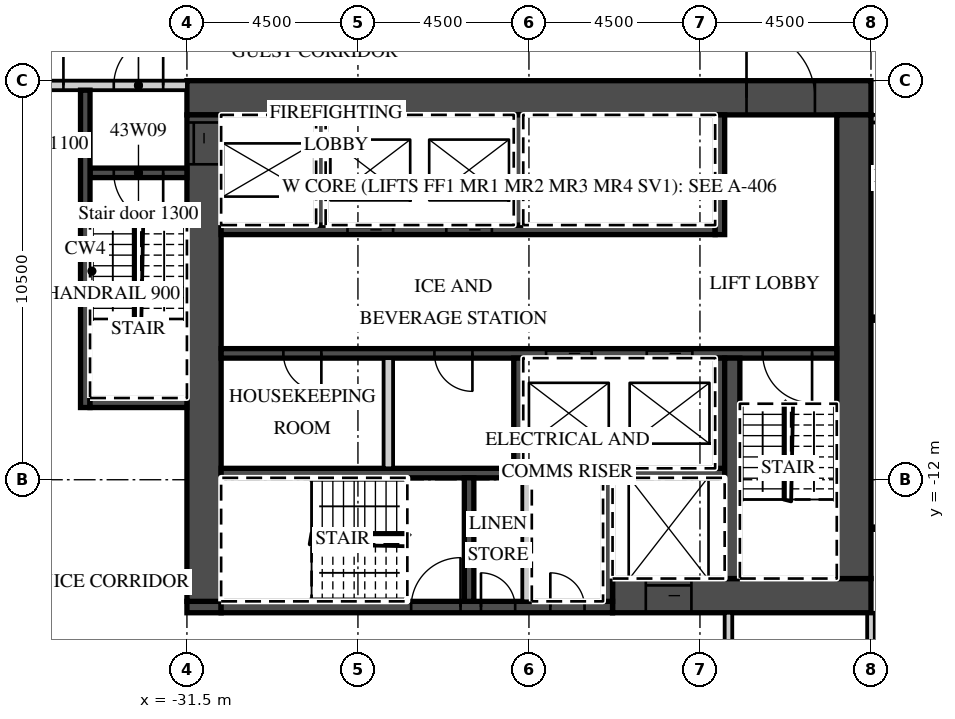
"""IFC4 building model, lengths in metres.
Left out: names, types, materials, properties, quantities, classifications, styles, units other than length and angle.
Written with IfcOpenShell. Run it as: python <this file> out.ifc"""

import sys

from ifc_helpers import new_model, si_unit, direction, frame, frame_2d, origin, place, context, subcontext, project, spatial, rectangle, extrude, element, fill, save


model = new_model("IFC4")
c1 = context("Model", 3, precision=1e-05, world=origin(), true_north=direction((0.0, 1.0)))
c2 = subcontext(c1, "Body", "Model", "MODEL_VIEW")
j1 = project(units=[si_unit("LENGTHUNIT", "METRE"), si_unit("PLANEANGLEUNIT", "RADIAN")], contexts=[c1])
p1 = place(None, origin())
s1 = spatial("IfcSite", under=j1, at=p1, CompositionType="ELEMENT")
p2 = place(p1, origin())
s2 = spatial("IfcBuilding", under=s1, at=p2, CompositionType="ELEMENT")
p3 = place(p2, frame((0.0, 0.0, 183.4)))
s3 = spatial("IfcBuildingStorey", under=s2, at=p3, CompositionType="ELEMENT", Elevation=183.4)
p4 = place(p3, frame((-13.5, -22.3, 0.0), z_axis=(0.0, 0.0, 1.0), x_axis=(0.0, 1.0, 0.0)))
e1 = element("IfcWall", 1, at=p4, inside=s3, PredefinedType="PARTITIONING", context=c2, shape_type="SweptSolid", body=[
    extrude(rectangle(XDim=6.8, YDim=0.2, at=frame_2d((3.4, 0.0))), origin(), (0.0, 0.0, 1.0), 3.02),
])
p5 = place(p3, frame((-13.5, -2.5, 0.0), z_axis=(0.0, 0.0, 1.0), x_axis=(1.0, 0.0, 0.0)))
e2 = element("IfcWall", 2, at=p5, inside=s3, PredefinedType="PARTITIONING", context=c2, shape_type="SweptSolid", body=[
    extrude(rectangle(XDim=27.0, YDim=0.2, at=frame_2d((13.5, 0.0))), origin(), (0.0, 0.0, 1.0), 3.02),
])
p6 = place(p5, frame((2.925, 0.0, 0.0)))
e3 = element("IfcOpeningElement", 3, at=p6, cuts=e2, PredefinedType="OPENING", context=c2, shape_type="SweptSolid", body=[
    extrude(rectangle(XDim=1.0, YDim=2.1, at=frame_2d((0.5, 1.05))), frame((0.0, 0.11, 0.0), z_axis=(0.0, -1.0, 0.0), x_axis=(1.0, 0.0, 0.0)), (0.0, 0.0, 1.0), 0.22),
])
p7 = place(p5, frame((7.45, 0.0, 0.0)))
e4 = element("IfcOpeningElement", 4, at=p7, cuts=e2, PredefinedType="OPENING", context=c2, shape_type="SweptSolid", body=[
    extrude(rectangle(XDim=1.0, YDim=2.1, at=frame_2d((0.5, 1.05))), frame((0.0, 0.11, 0.0), z_axis=(0.0, -1.0, 0.0), x_axis=(1.0, 0.0, 0.0)), (0.0, 0.0, 1.0), 0.22),
])
p8 = place(p5, frame((11.925, 0.0, 0.0)))
e5 = element("IfcOpeningElement", 5, at=p8, cuts=e2, PredefinedType="OPENING", context=c2, shape_type="SweptSolid", body=[
    extrude(rectangle(XDim=1.0, YDim=2.1, at=frame_2d((0.5, 1.05))), frame((0.0, 0.11, 0.0), z_axis=(0.0, -1.0, 0.0), x_axis=(1.0, 0.0, 0.0)), (0.0, 0.0, 1.0), 0.22),
])
p9 = place(p5, frame((18.862, 0.0, 0.0)))
e6 = element("IfcOpeningElement", 6, at=p9, cuts=e2, PredefinedType="OPENING", context=c2, shape_type="SweptSolid", body=[
    extrude(rectangle(XDim=1.2, YDim=2.1, at=frame_2d((0.6, 1.05))), frame((0.0, 0.11, 0.0), z_axis=(0.0, -1.0, 0.0), x_axis=(1.0, 0.0, 0.0)), (0.0, 0.0, 1.0), 0.22),
])
p10 = place(p5, frame((25.425, 0.0, 0.0)))
e7 = element("IfcOpeningElement", 7, at=p10, cuts=e2, PredefinedType="OPENING", context=c2, shape_type="SweptSolid", body=[
    extrude(rectangle(XDim=1.0, YDim=2.1, at=frame_2d((0.5, 1.05))), frame((0.0, 0.11, 0.0), z_axis=(0.0, -1.0, 0.0), x_axis=(1.0, 0.0, 0.0)), (0.0, 0.0, 1.0), 0.22),
])
p11 = place(p3, frame((-31.5, -1.95, 0.0), z_axis=(0.0, 0.0, 1.0), x_axis=(1.0, 0.0, 0.0)))
e8 = element("IfcWall", 8, at=p11, inside=s3, PredefinedType="SHEAR", context=c2, shape_type="SweptSolid", body=[
    extrude(rectangle(XDim=18.0, YDim=0.9, at=frame_2d((9.0, 0.0))), origin(), (0.0, 0.0, 1.0), 3.02),
])
p12 = place(p11, frame((14.725, 0.0, 0.0)))
e9 = element("IfcOpeningElement", 9, at=p12, cuts=e8, PredefinedType="OPENING", context=c2, shape_type="SweptSolid", body=[
    extrude(rectangle(XDim=1.8, YDim=2.1, at=frame_2d((0.9, 1.05))), frame((0.0, 0.46, 0.0), z_axis=(0.0, -1.0, 0.0), x_axis=(1.0, 0.0, 0.0)), (0.0, 0.0, 1.0), 0.92),
])
p13 = place(p3, frame((-20.3, -15.05, 0.0), z_axis=(0.0, 0.0, 1.0), x_axis=(1.0, 0.0, 0.0)))
e10 = element("IfcWall", 10, at=p13, inside=s3, PredefinedType="SHEAR", context=c2, shape_type="SweptSolid", body=[
    extrude(rectangle(XDim=6.8, YDim=0.9, at=frame_2d((3.4, 0.0))), origin(), (0.0, 0.0, 1.0), 3.02),
])
p14 = place(p13, frame((0.875, 0.0, 0.0)))
e11 = element("IfcOpeningElement", 11, at=p14, cuts=e10, PredefinedType="OPENING", context=c2, shape_type="SweptSolid", body=[
    extrude(rectangle(XDim=1.2, YDim=2.1, at=frame_2d((0.6, 1.05))), frame((0.0, 0.46, 0.0), z_axis=(0.0, -1.0, 0.0), x_axis=(1.0, 0.0, 0.0)), (0.0, 0.0, 1.0), 0.92),
])
p15 = place(p3, frame((-31.5, -15.35, 0.0), z_axis=(0.0, 0.0, 1.0), x_axis=(1.0, 0.0, 0.0)))
e12 = element("IfcWall", 12, at=p15, inside=s3, PredefinedType="SHEAR", context=c2, shape_type="SweptSolid", body=[
    extrude(rectangle(XDim=0.9, YDim=0.3, at=frame_2d((0.45, 0.0))), origin(), (0.0, 0.0, 1.0), 3.02),
])
p16 = place(p3, frame((-30.6, -15.35, 0.0), z_axis=(0.0, 0.0, 1.0), x_axis=(1.0, 0.0, 0.0)))
e13 = element("IfcWall", 13, at=p16, inside=s3, PredefinedType="SHEAR", context=c2, shape_type="SweptSolid", body=[
    extrude(rectangle(XDim=10.3, YDim=0.3, at=frame_2d((5.15, 0.0))), origin(), (0.0, 0.0, 1.0), 3.02),
])
p17 = place(p16, frame((5.0, 0.0, 0.0)))
e14 = element("IfcOpeningElement", 14, at=p17, cuts=e13, PredefinedType="OPENING", context=c2, shape_type="SweptSolid", body=[
    extrude(rectangle(XDim=1.3, YDim=2.1, at=frame_2d((0.65, 1.05))), frame((0.0, 0.16, 0.0), z_axis=(0.0, -1.0, 0.0), x_axis=(1.0, 0.0, 0.0)), (0.0, 0.0, 1.0), 0.32),
])
p18 = place(p16, frame((6.837, 0.0, 0.0)))
e15 = element("IfcOpeningElement", 15, at=p18, cuts=e13, PredefinedType="OPENING", context=c2, shape_type="SweptSolid", body=[
    extrude(rectangle(XDim=0.9, YDim=2.1, at=frame_2d((0.45, 1.05))), frame((0.0, 0.16, 0.0), z_axis=(0.0, -1.0, 0.0), x_axis=(1.0, 0.0, 0.0)), (0.0, 0.0, 1.0), 0.32),
])
p19 = place(p16, frame((8.663, 0.0, 0.0)))
e16 = element("IfcOpeningElement", 16, at=p19, cuts=e13, PredefinedType="OPENING", context=c2, shape_type="SweptSolid", body=[
    extrude(rectangle(XDim=0.9, YDim=2.1, at=frame_2d((0.45, 1.05))), frame((0.0, 0.16, 0.0), z_axis=(0.0, -1.0, 0.0), x_axis=(1.0, 0.0, 0.0)), (0.0, 0.0, 1.0), 0.32),
])
p20 = place(p3, frame((-31.05, -15.2, 0.0), z_axis=(0.0, 0.0, 1.0), x_axis=(0.0, 1.0, 0.0)))
e17 = element("IfcWall", 17, at=p20, inside=s3, PredefinedType="SHEAR", context=c2, shape_type="SweptSolid", body=[
    extrude(rectangle(XDim=12.8, YDim=0.9, at=frame_2d((6.4, 0.0))), origin(), (0.0, 0.0, 1.0), 3.02),
])
p21 = place(p20, frame((11.5, 0.0, 0.0)))
e18 = element("IfcOpeningElement", 18, at=p21, cuts=e17, PredefinedType="OPENING", context=c2, shape_type="SweptSolid", body=[
    extrude(rectangle(XDim=1.1, YDim=2.1, at=frame_2d((0.55, 1.05))), frame((0.0, 0.46, 0.0), z_axis=(0.0, -1.0, 0.0), x_axis=(1.0, 0.0, 0.0)), (0.0, 0.0, 1.0), 0.92),
])
p22 = place(p3, frame((-13.95, -14.6, 0.0), z_axis=(0.0, 0.0, 1.0), x_axis=(0.0, 1.0, 0.0)))
e19 = element("IfcWall", 19, at=p22, inside=s3, PredefinedType="SHEAR", context=c2, shape_type="SweptSolid", body=[
    extrude(rectangle(XDim=12.2, YDim=0.9, at=frame_2d((6.1, 0.0))), origin(), (0.0, 0.0, 1.0), 3.02),
])
p23 = place(p3, frame((-30.6, -5.425, 0.0), z_axis=(0.0, 0.0, 1.0), x_axis=(1.0, 0.0, 0.0)))
e20 = element("IfcWall", 20, at=p23, inside=s3, PredefinedType="SHEAR", context=c2, shape_type="SweptSolid", body=[
    extrude(rectangle(XDim=13.0, YDim=0.25, at=frame_2d((6.5, 0.0))), origin(), (0.0, 0.0, 1.0), 3.02),
])
p24 = place(p23, frame((3.325, 0.0, 0.0)))
e21 = element("IfcOpeningElement", 21, at=p24, cuts=e20, PredefinedType="OPENING", context=c2, shape_type="SweptSolid", body=[
    extrude(rectangle(XDim=1.2, YDim=2.1, at=frame_2d((0.6, 1.05))), frame((0.0, 0.135, 0.0), z_axis=(0.0, -1.0, 0.0), x_axis=(1.0, 0.0, 0.0)), (0.0, 0.0, 1.0), 0.27),
])
p25 = place(p23, frame((5.925, 0.0, 0.0)))
e22 = element("IfcOpeningElement", 22, at=p25, cuts=e20, PredefinedType="OPENING", context=c2, shape_type="SweptSolid", body=[
    extrude(rectangle(XDim=1.2, YDim=2.1, at=frame_2d((0.6, 1.05))), frame((0.0, 0.135, 0.0), z_axis=(0.0, -1.0, 0.0), x_axis=(1.0, 0.0, 0.0)), (0.0, 0.0, 1.0), 0.27),
])
p26 = place(p3, frame((-17.475, -5.55, 0.0), z_axis=(0.0, 0.0, 1.0), x_axis=(0.0, 1.0, 0.0)))
e23 = element("IfcWall", 23, at=p26, inside=s3, PredefinedType="SHEAR", context=c2, shape_type="SweptSolid", body=[
    extrude(rectangle(XDim=3.15, YDim=0.25, at=frame_2d((1.575, 0.0))), origin(), (0.0, 0.0, 1.0), 3.02),
])
for number, where, z_axis, x_axis in (
    (24, (-27.975, -5.3, 0.0), (0.0, 0.0, 1.0), (0.0, 1.0, 0.0)),
    (25, (-22.775, -5.3, 0.0), (0.0, 0.0, 1.0), (0.0, 1.0, 0.0)),
):
    element("IfcWall", number, at=place(p3, frame(where, z_axis=z_axis, x_axis=x_axis)), inside=s3, PredefinedType="SHEAR", context=c2, shape_type="SweptSolid", body=[
        extrude(rectangle(XDim=2.9, YDim=0.25, at=frame_2d((1.45, 0.0))), origin(), (0.0, 0.0, 1.0), 3.02),
    ])
p27 = place(p3, frame((-30.6, -8.675, 0.0), z_axis=(0.0, 0.0, 1.0), x_axis=(1.0, 0.0, 0.0)))
e26 = element("IfcWall", 26, at=p27, inside=s3, PredefinedType="SHEAR", context=c2, shape_type="SweptSolid", body=[
    extrude(rectangle(XDim=16.2, YDim=0.25, at=frame_2d((8.1, 0.0))), origin(), (0.0, 0.0, 1.0), 3.02),
])
p28 = place(p27, frame((8.55, 0.0, 0.0)))
e27 = element("IfcOpeningElement", 27, at=p28, cuts=e26, PredefinedType="OPENING", context=c2, shape_type="SweptSolid", body=[
    extrude(rectangle(XDim=1.2, YDim=2.1, at=frame_2d((0.6, 1.05))), frame((0.0, 0.135, 0.0), z_axis=(0.0, -1.0, 0.0), x_axis=(1.0, 0.0, 0.0)), (0.0, 0.0, 1.0), 0.27),
])
p29 = place(p27, frame((11.2, 0.0, 0.0)))
e28 = element("IfcOpeningElement", 28, at=p29, cuts=e26, PredefinedType="OPENING", context=c2, shape_type="SweptSolid", body=[
    extrude(rectangle(XDim=1.2, YDim=2.1, at=frame_2d((0.6, 1.05))), frame((0.0, 0.135, 0.0), z_axis=(0.0, -1.0, 0.0), x_axis=(1.0, 0.0, 0.0)), (0.0, 0.0, 1.0), 0.27),
])
p30 = place(p27, frame((14.25, 0.0, 0.0)))
e29 = element("IfcOpeningElement", 29, at=p30, cuts=e26, PredefinedType="OPENING", context=c2, shape_type="SweptSolid", body=[
    extrude(rectangle(XDim=1.3, YDim=2.1, at=frame_2d((0.65, 1.05))), frame((0.0, 0.135, 0.0), z_axis=(0.0, -1.0, 0.0), x_axis=(1.0, 0.0, 0.0)), (0.0, 0.0, 1.0), 0.27),
])
p31 = place(p27, frame((1.637, 0.0, 0.0)))
e30 = element("IfcOpeningElement", 30, at=p31, cuts=e26, PredefinedType="OPENING", context=c2, shape_type="SweptSolid", body=[
    extrude(rectangle(XDim=1.0, YDim=2.1, at=frame_2d((0.5, 1.05))), frame((0.0, 0.135, 0.0), z_axis=(0.0, -1.0, 0.0), x_axis=(1.0, 0.0, 0.0)), (0.0, 0.0, 1.0), 0.27),
])
p32 = place(p27, frame((5.613, 0.0, 0.0)))
e31 = element("IfcOpeningElement", 31, at=p32, cuts=e26, PredefinedType="OPENING", context=c2, shape_type="SweptSolid", body=[
    extrude(rectangle(XDim=1.0, YDim=2.1, at=frame_2d((0.5, 1.05))), frame((0.0, 0.135, 0.0), z_axis=(0.0, -1.0, 0.0), x_axis=(1.0, 0.0, 0.0)), (0.0, 0.0, 1.0), 0.27),
])
p33 = place(p3, frame((-30.6, -11.825, 0.0), z_axis=(0.0, 0.0, 1.0), x_axis=(1.0, 0.0, 0.0)))
e32 = element("IfcWall", 32, at=p33, inside=s3, PredefinedType="SHEAR", context=c2, shape_type="SweptSolid", body=[
    extrude(rectangle(XDim=13.25, YDim=0.25, at=frame_2d((6.625, 0.0))), origin(), (0.0, 0.0, 1.0), 3.02),
])
for number, where, z_axis, x_axis in (
    (33, (-17.475, -11.7, 0.0), (0.0, 0.0, 1.0), (0.0, 1.0, 0.0)),
    (34, (-22.775, -11.7, 0.0), (0.0, 0.0, 1.0), (0.0, 1.0, 0.0)),
):
    element("IfcWall", number, at=place(p3, frame(where, z_axis=z_axis, x_axis=x_axis)), inside=s3, PredefinedType="SHEAR", context=c2, shape_type="SweptSolid", body=[
        extrude(rectangle(XDim=2.9, YDim=0.25, at=frame_2d((1.45, 0.0))), origin(), (0.0, 0.0, 1.0), 3.02),
    ])
p34 = place(p3, frame((-26.2, -11.7, 0.0), z_axis=(0.0, 0.0, 1.0), x_axis=(0.0, 1.0, 0.0)))
e35 = element("IfcWall", 35, at=p34, inside=s3, PredefinedType="PARTITIONING", context=c2, shape_type="SweptSolid", body=[
    extrude(rectangle(XDim=2.9, YDim=0.25, at=frame_2d((1.45, 0.0))), origin(), (0.0, 0.0, 1.0), 3.02),
])
p35 = place(p3, frame((-17.15, -14.6, 0.0), z_axis=(0.0, 0.0, 1.0), x_axis=(0.0, 1.0, 0.0)))
e36 = element("IfcWall", 36, at=p35, inside=s3, PredefinedType="SHEAR", context=c2, shape_type="SweptSolid", body=[
    extrude(rectangle(XDim=5.8, YDim=0.4, at=frame_2d((2.9, 0.0))), origin(), (0.0, 0.0, 1.0), 3.02),
])
for number, where, z_axis, x_axis in (
    (37, (-20.425, -15.2, 0.0), (0.0, 0.0, 1.0), (0.0, 1.0, 0.0)),
    (38, (-24.075, -15.2, 0.0), (0.0, 0.0, 1.0), (0.0, 1.0, 0.0)),
):
    element("IfcWall", number, at=place(p3, frame(where, z_axis=z_axis, x_axis=x_axis)), inside=s3, PredefinedType="SHEAR", context=c2, shape_type="SweptSolid", body=[
        extrude(rectangle(XDim=3.25, YDim=0.25, at=frame_2d((1.625, 0.0))), origin(), (0.0, 0.0, 1.0), 3.02),
    ])
p36 = place(p3, frame((-22.55, -15.2, 0.0), z_axis=(0.0, 0.0, 1.0), x_axis=(0.0, 1.0, 0.0)))
e39 = element("IfcWall", 39, at=p36, inside=s3, PredefinedType="PARTITIONING", context=c2, shape_type="SweptSolid", body=[
    extrude(rectangle(XDim=3.25, YDim=0.25, at=frame_2d((1.625, 0.0))), origin(), (0.0, 0.0, 1.0), 3.02),
])
p37 = place(p3, frame((-42.632, -1.625, 0.0), z_axis=(0.0, 0.0, 1.0), x_axis=(1.0, 0.0, 0.0)))
e40 = element("IfcWall", 40, at=p37, inside=s3, PredefinedType="PARTITIONING", context=c2, shape_type="SweptSolid", body=[
    extrude(rectangle(XDim=11.132, YDim=0.25, at=frame_2d((5.566, 0.0))), origin(), (0.0, 0.0, 1.0), 3.02),
])
p38 = place(p37, frame((9.207, 0.0, 0.0)))
e41 = element("IfcOpeningElement", 41, at=p38, cuts=e40, PredefinedType="OPENING", context=c2, shape_type="SweptSolid", body=[
    extrude(rectangle(XDim=1.3, YDim=2.1, at=frame_2d((0.65, 1.05))), frame((0.0, 0.135, 0.0), z_axis=(0.0, -1.0, 0.0), x_axis=(1.0, 0.0, 0.0)), (0.0, 0.0, 1.0), 0.27),
])
p39 = place(p37, frame((6.781, 0.0, 0.0)))
e42 = element("IfcOpeningElement", 42, at=p39, cuts=e40, PredefinedType="OPENING", context=c2, shape_type="SweptSolid", body=[
    extrude(rectangle(XDim=1.1, YDim=2.1, at=frame_2d((0.55, 1.05))), frame((0.0, 0.135, 0.0), z_axis=(0.0, -1.0, 0.0), x_axis=(1.0, 0.0, 0.0)), (0.0, 0.0, 1.0), 0.27),
])
p40 = place(p3, frame((-34.05, -3.925, 0.0), z_axis=(0.0, 0.0, 1.0), x_axis=(1.0, 0.0, 0.0)))
e43 = element("IfcWall", 43, at=p40, inside=s3, PredefinedType="SHEAR", context=c2, shape_type="SweptSolid", body=[
    extrude(rectangle(XDim=2.55, YDim=0.25, at=frame_2d((1.275, 0.0))), origin(), (0.0, 0.0, 1.0), 3.02),
])
p41 = place(p40, frame((0.625, 0.0, 0.0)))
e44 = element("IfcOpeningElement", 44, at=p41, cuts=e43, PredefinedType="OPENING", context=c2, shape_type="SweptSolid", body=[
    extrude(rectangle(XDim=1.3, YDim=2.1, at=frame_2d((0.65, 1.05))), frame((0.0, 0.135, 0.0), z_axis=(0.0, -1.0, 0.0), x_axis=(1.0, 0.0, 0.0)), (0.0, 0.0, 1.0), 0.27),
])
p42 = place(p3, frame((-34.175, -10.1, 0.0), z_axis=(0.0, 0.0, 1.0), x_axis=(0.0, 1.0, 0.0)))
e45 = element("IfcWall", 45, at=p42, inside=s3, PredefinedType="SHEAR", context=c2, shape_type="SweptSolid", body=[
    extrude(rectangle(XDim=8.35, YDim=0.25, at=frame_2d((4.175, 0.0))), origin(), (0.0, 0.0, 1.0), 3.02),
])
p43 = place(p3, frame((-34.05, -9.975, 0.0), z_axis=(0.0, 0.0, 1.0), x_axis=(1.0, 0.0, 0.0)))
e46 = element("IfcWall", 46, at=p43, inside=s3, PredefinedType="SHEAR", context=c2, shape_type="SweptSolid", body=[
    extrude(rectangle(XDim=2.55, YDim=0.25, at=frame_2d((1.275, 0.0))), origin(), (0.0, 0.0, 1.0), 3.02),
])
p44 = place(p3, frame((-17.25, -17.7, 0.0), z_axis=(0.0, 0.0, 1.0), x_axis=(0.0, 1.0, 0.0)))
e47 = element("IfcWall", 47, at=p44, inside=s3, PredefinedType="PARTITIONING", context=c2, shape_type="SweptSolid", body=[
    extrude(rectangle(XDim=2.2, YDim=0.2, at=frame_2d((1.1, 0.0))), origin(), (0.0, 0.0, 1.0), 3.02),
])
p45 = place(p28, origin())
e48 = element("IfcDoor", 48, at=p45, inside=s3, OperationType="SLIDING_TO_LEFT", PredefinedType="DOOR", context=c2, shape_type="SweptSolid", body=[
    extrude(rectangle(XDim=1.2, YDim=2.1, at=frame_2d((0.6, 1.05))), frame((0.0, 0.025, 0.0), z_axis=(0.0, -1.0, 0.0), x_axis=(1.0, 0.0, 0.0)), (0.0, 0.0, 1.0), 0.05),
])
fill(e27, e48)
p46 = place(p29, origin())
e49 = element("IfcDoor", 49, at=p46, inside=s3, OperationType="SLIDING_TO_RIGHT", PredefinedType="DOOR", context=c2, shape_type="SweptSolid", body=[
    extrude(rectangle(XDim=1.2, YDim=2.1, at=frame_2d((0.6, 1.05))), frame((0.0, 0.025, 0.0), z_axis=(0.0, -1.0, 0.0), x_axis=(1.0, 0.0, 0.0)), (0.0, 0.0, 1.0), 0.05),
])
fill(e28, e49)
p47 = place(p24, origin())
e50 = element("IfcDoor", 50, at=p47, inside=s3, OperationType="SLIDING_TO_RIGHT", PredefinedType="DOOR", context=c2, shape_type="SweptSolid", body=[
    extrude(rectangle(XDim=1.2, YDim=2.1, at=frame_2d((0.6, 1.05))), frame((0.0, 0.025, 0.0), z_axis=(0.0, -1.0, 0.0), x_axis=(1.0, 0.0, 0.0)), (0.0, 0.0, 1.0), 0.05),
])
fill(e21, e50)
p48 = place(p25, origin())
e51 = element("IfcDoor", 51, at=p48, inside=s3, OperationType="SLIDING_TO_RIGHT", PredefinedType="DOOR", context=c2, shape_type="SweptSolid", body=[
    extrude(rectangle(XDim=1.2, YDim=2.1, at=frame_2d((0.6, 1.05))), frame((0.0, 0.025, 0.0), z_axis=(0.0, -1.0, 0.0), x_axis=(1.0, 0.0, 0.0)), (0.0, 0.0, 1.0), 0.05),
])
fill(e22, e51)
p49 = place(p14, origin())
e52 = element("IfcDoor", 52, at=p49, inside=s3, OperationType="SLIDING_TO_LEFT", PredefinedType="DOOR", context=c2, shape_type="SweptSolid", body=[
    extrude(rectangle(XDim=1.2, YDim=2.1, at=frame_2d((0.6, 1.05))), frame((0.0, 0.025, 0.0), z_axis=(0.0, -1.0, 0.0), x_axis=(1.0, 0.0, 0.0)), (0.0, 0.0, 1.0), 0.05),
])
fill(e11, e52)
p50 = place(p21, origin())
e53 = element("IfcDoor", 53, at=p50, inside=s3, OperationType="SLIDING_TO_RIGHT", PredefinedType="DOOR", context=c2, shape_type="SweptSolid", body=[
    extrude(rectangle(XDim=1.1, YDim=2.1, at=frame_2d((0.55, 1.05))), frame((0.0, 0.025, 0.0), z_axis=(0.0, -1.0, 0.0), x_axis=(1.0, 0.0, 0.0)), (0.0, 0.0, 1.0), 0.05),
])
fill(e18, e53)
p51 = place(p12, origin())
e54 = element("IfcDoor", 54, at=p51, inside=s3, OperationType="DOUBLE_DOOR_DOUBLE_SWING", PredefinedType="DOOR", context=c2, shape_type="SweptSolid", body=[
    extrude(rectangle(XDim=1.8, YDim=2.1, at=frame_2d((0.9, 1.05))), frame((0.0, 0.025, 0.0), z_axis=(0.0, -1.0, 0.0), x_axis=(1.0, 0.0, 0.0)), (0.0, 0.0, 1.0), 0.05),
])
fill(e9, e54)
p52 = place(p38, origin())
e55 = element("IfcDoor", 55, at=p52, inside=s3, OperationType="SINGLE_SWING_RIGHT", PredefinedType="DOOR", context=c2, shape_type="SweptSolid", body=[
    extrude(rectangle(XDim=1.3, YDim=2.1, at=frame_2d((0.65, 1.05))), frame((0.0, 0.025, 0.0), z_axis=(0.0, -1.0, 0.0), x_axis=(1.0, 0.0, 0.0)), (0.0, 0.0, 1.0), 0.05),
])
fill(e41, e55)
p53 = place(p41, origin())
e56 = element("IfcDoor", 56, at=p53, inside=s3, OperationType="SINGLE_SWING_RIGHT", PredefinedType="DOOR", context=c2, shape_type="SweptSolid", body=[
    extrude(rectangle(XDim=1.3, YDim=2.1, at=frame_2d((0.65, 1.05))), frame((0.0, 0.025, 0.0), z_axis=(0.0, -1.0, 0.0), x_axis=(1.0, 0.0, 0.0)), (0.0, 0.0, 1.0), 0.05),
])
fill(e44, e56)
p54 = place(p39, origin())
e57 = element("IfcDoor", 57, at=p54, inside=s3, OperationType="SINGLE_SWING_RIGHT", PredefinedType="DOOR", context=c2, shape_type="SweptSolid", body=[
    extrude(rectangle(XDim=1.1, YDim=2.1, at=frame_2d((0.55, 1.05))), frame((0.0, 0.025, 0.0), z_axis=(0.0, -1.0, 0.0), x_axis=(1.0, 0.0, 0.0)), (0.0, 0.0, 1.0), 0.05),
])
fill(e42, e57)
p55 = place(p30, origin())
e58 = element("IfcDoor", 58, at=p55, inside=s3, OperationType="SINGLE_SWING_RIGHT", PredefinedType="DOOR", context=c2, shape_type="SweptSolid", body=[
    extrude(rectangle(XDim=1.3, YDim=2.1, at=frame_2d((0.65, 1.05))), frame((0.0, 0.025, 0.0), z_axis=(0.0, -1.0, 0.0), x_axis=(1.0, 0.0, 0.0)), (0.0, 0.0, 1.0), 0.05),
])
fill(e29, e58)
p56 = place(p17, origin())
e59 = element("IfcDoor", 59, at=p56, inside=s3, OperationType="SINGLE_SWING_RIGHT", PredefinedType="DOOR", context=c2, shape_type="SweptSolid", body=[
    extrude(rectangle(XDim=1.3, YDim=2.1, at=frame_2d((0.65, 1.05))), frame((0.0, 0.025, 0.0), z_axis=(0.0, -1.0, 0.0), x_axis=(1.0, 0.0, 0.0)), (0.0, 0.0, 1.0), 0.05),
])
fill(e14, e59)
p57 = place(p18, origin())
e60 = element("IfcDoor", 60, at=p57, inside=s3, OperationType="SINGLE_SWING_LEFT", PredefinedType="DOOR", context=c2, shape_type="SweptSolid", body=[
    extrude(rectangle(XDim=0.9, YDim=2.1, at=frame_2d((0.45, 1.05))), frame((0.0, 0.025, 0.0), z_axis=(0.0, -1.0, 0.0), x_axis=(1.0, 0.0, 0.0)), (0.0, 0.0, 1.0), 0.05),
])
fill(e15, e60)
p58 = place(p19, origin())
e61 = element("IfcDoor", 61, at=p58, inside=s3, OperationType="SINGLE_SWING_LEFT", PredefinedType="DOOR", context=c2, shape_type="SweptSolid", body=[
    extrude(rectangle(XDim=0.9, YDim=2.1, at=frame_2d((0.45, 1.05))), frame((0.0, 0.025, 0.0), z_axis=(0.0, -1.0, 0.0), x_axis=(1.0, 0.0, 0.0)), (0.0, 0.0, 1.0), 0.05),
])
fill(e16, e61)
p59 = place(p31, origin())
e62 = element("IfcDoor", 62, at=p59, inside=s3, OperationType="SINGLE_SWING_RIGHT", PredefinedType="DOOR", context=c2, shape_type="SweptSolid", body=[
    extrude(rectangle(XDim=1.0, YDim=2.1, at=frame_2d((0.5, 1.05))), frame((0.0, 0.025, 0.0), z_axis=(0.0, -1.0, 0.0), x_axis=(1.0, 0.0, 0.0)), (0.0, 0.0, 1.0), 0.05),
])
fill(e30, e62)
p60 = place(p32, origin())
e63 = element("IfcDoor", 63, at=p60, inside=s3, OperationType="SINGLE_SWING_RIGHT", PredefinedType="DOOR", context=c2, shape_type="SweptSolid", body=[
    extrude(rectangle(XDim=1.0, YDim=2.1, at=frame_2d((0.5, 1.05))), frame((0.0, 0.025, 0.0), z_axis=(0.0, -1.0, 0.0), x_axis=(1.0, 0.0, 0.0)), (0.0, 0.0, 1.0), 0.05),
])
fill(e31, e63)
save(model, sys.argv[1])
